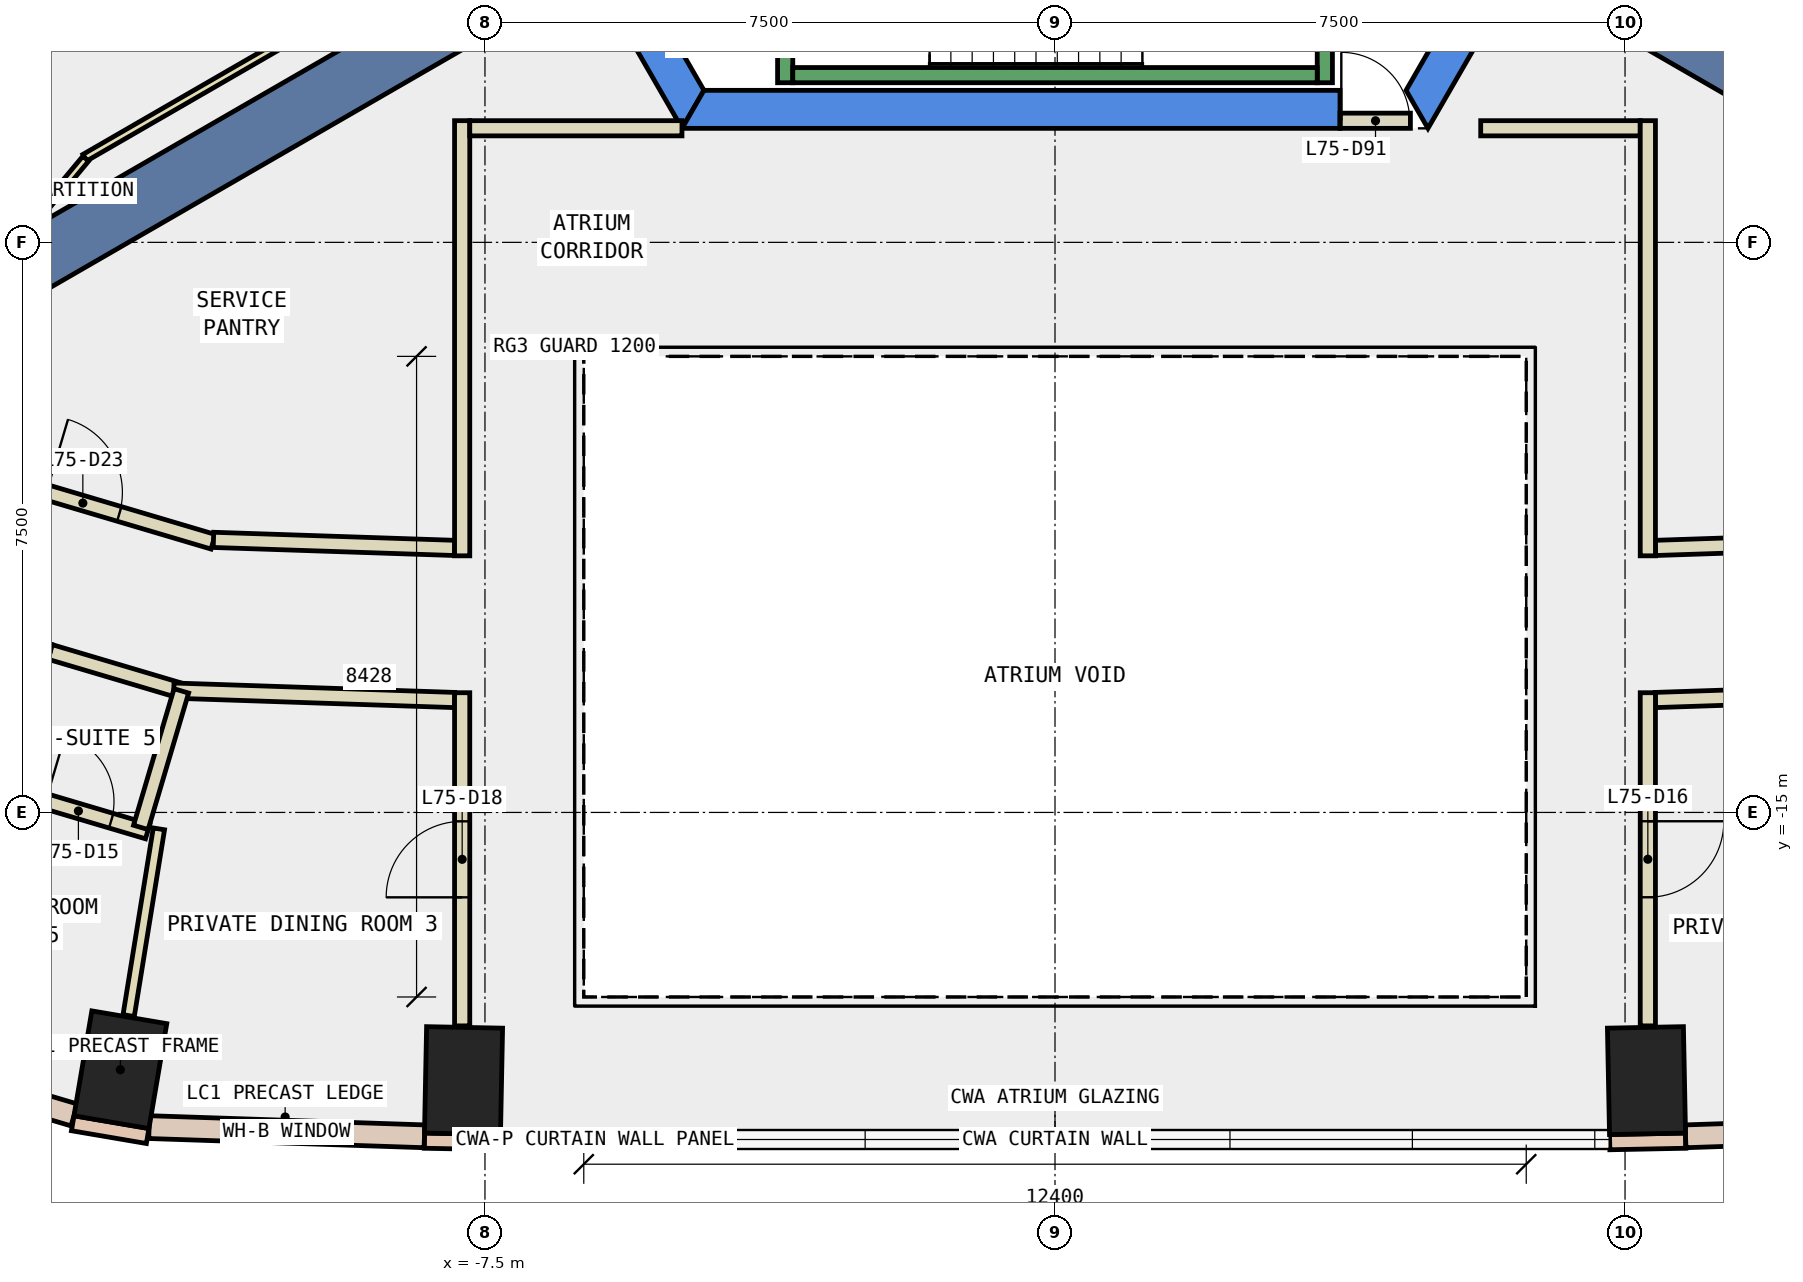
"""IFC4 building model, lengths in metres.
Left out: names, types, materials, properties, quantities, classifications, styles, units other than length and angle.
Written with IfcOpenShell. Run it as: python <this file> out.ifc"""

import sys

from ifc_helpers import new_model, si_unit, direction, frame, frame_2d, origin, origin_2d, place, context, subcontext, project, spatial, polyline, rectangle, outline, extrude, element, fill, save


model = new_model("IFC4")
c1 = context("Model", 3, precision=1e-05, world=origin(), true_north=direction((0.0, 1.0)))
c2 = subcontext(c1, "Body", "Model", "MODEL_VIEW")
j1 = project(units=[si_unit("LENGTHUNIT", "METRE"), si_unit("PLANEANGLEUNIT", "RADIAN")], contexts=[c1])
p1 = place(None, origin())
s1 = spatial("IfcSite", under=j1, at=p1, CompositionType="ELEMENT")
p2 = place(p1, origin())
s2 = spatial("IfcBuilding", under=s1, at=p2, CompositionType="ELEMENT")
p3 = place(p2, frame((0.0, 0.0, 318.8)))
s3 = spatial("IfcBuildingStorey", under=s2, at=p3, CompositionType="ELEMENT", Elevation=318.8)
for number, where, z_axis, x_axis in (
    (1, (-12.297, -18.385, -0.34), (0.0, 0.0, 1.0), (-0.986, 0.168, 0.0)),
    (2, (-7.782, -18.528, -0.34), (0.0, 0.0, 1.0), (-1.0, 0.02, 0.0)),
    (3, (7.782, -18.528, -0.34), (0.0, 0.0, 1.0), (1.0, 0.02, 0.0)),
):
    element("IfcColumn", number, at=place(p3, frame(where, z_axis=z_axis, x_axis=x_axis)), inside=s3, PredefinedType="COLUMN", context=c2, shape_type="SweptSolid", body=[
        extrude(rectangle(XDim=1.0, YDim=1.4, at=origin_2d()), origin(), (0.0, 0.0, 1.0), 3.6),
    ])
p4 = place(p3, frame((0.0, 0.0, -0.34)))
e4 = element("IfcWall", 4, at=p4, inside=s3, PredefinedType="SHEAR", context=c2, shape_type="SweptSolid", body=[
    extrude(outline(polyline([(-9.815, 2.5), (-4.907, -6.0), (-4.619, -5.5), (-9.238, 2.5), (-9.815, 2.5)])), origin(), (0.0, 0.0, 1.0), 3.6),
])
p5 = place(p3, frame((0.0, 0.0, -0.34)))
e5 = element("IfcWall", 5, at=p5, inside=s3, PredefinedType="SHEAR", context=c2, shape_type="SweptSolid", body=[
    extrude(outline(polyline([(3.75, -6.0), (3.75, -5.5), (-4.619, -5.5), (-4.907, -6.0), (3.75, -6.0)])), origin(), (0.0, 0.0, 1.0), 3.6),
])
p6 = place(p3, frame((0.0, 0.0, -0.34)))
e6 = element("IfcWall", 6, at=p6, inside=s3, PredefinedType="SHEAR", context=c2, shape_type="SweptSolid", body=[
    extrude(outline(polyline([(4.907, -6.0), (9.815, 2.5), (9.238, 2.5), (4.619, -5.5), (4.907, -6.0)])), origin(), (0.0, 0.0, 1.0), 3.6),
])
for number, where, z_axis, x_axis in (
    (7, (6.279, -3.625, -0.34), (0.0, 0.0, 1.0), (0.866, -0.5, 0.0)),
    (8, (-6.279, -3.625, -0.34), (0.0, 0.0, 1.0), (-0.866, -0.5, 0.0)),
):
    element("IfcWall", number, at=place(p3, frame(where, z_axis=z_axis, x_axis=x_axis)), inside=s3, PredefinedType="SHEAR", context=c2, shape_type="SweptSolid", body=[
        extrude(rectangle(XDim=9.0, YDim=0.8, at=frame_2d((4.5, 0.0))), origin(), (0.0, 0.0, 1.0), 3.6),
    ])
for number, where, z_axis, x_axis in (
    (9, (-12.924, -19.089, 0.0), (0.0, 0.0, 1.0), (0.986, -0.168, 0.0)),
    (10, (-8.298, -19.318, 0.0), (0.0, 0.0, 1.0), (1.0, -0.02, 0.0)),
    (11, (7.298, -19.338, 0.0), (0.0, 0.0, 1.0), (1.0, 0.02, 0.0)),
):
    element("IfcWall", number, at=place(p3, frame(where, z_axis=z_axis, x_axis=x_axis)), inside=s3, PredefinedType="STANDARD", context=c2, shape_type="SweptSolid", body=[
        extrude(rectangle(XDim=1.0, YDim=0.2, at=frame_2d((0.5, 0.0))), origin(), (0.0, 0.0, 1.0), 3.26),
    ])
p7 = place(p3, frame((-11.919, -19.14, 0.0), z_axis=(0.0, 0.0, 1.0), x_axis=(0.999441913039, -0.033404527552, 0.0)))
e12 = element("IfcWall", 12, at=p7, inside=s3, PredefinedType="STANDARD", context=c2, shape_type="SweptSolid", body=[
    extrude(rectangle(XDim=3.625, YDim=0.3, at=frame_2d((1.812, 0.0))), origin(), (0.0, 0.0, 1.0), 3.26),
])
p8 = place(p7, frame((1.113, 0.0, 0.9)))
e13 = element("IfcOpeningElement", 13, at=p8, cuts=e12, PredefinedType="OPENING", context=c2, shape_type="SweptSolid", body=[
    extrude(rectangle(XDim=1.4, YDim=2.0, at=frame_2d((0.7, 1.0))), frame((0.0, 0.16, 0.0), z_axis=(0.0, -1.0, 0.0), x_axis=(1.0, 0.0, 0.0)), (0.0, 0.0, 1.0), 0.32),
])
p9 = place(p3, frame((8.296, -19.261, 0.0), z_axis=(0.0, 0.0, 1.0), x_axis=(0.999441913039, 0.033404527552, 0.0)))
e14 = element("IfcWall", 14, at=p9, inside=s3, PredefinedType="STANDARD", context=c2, shape_type="SweptSolid", body=[
    extrude(rectangle(XDim=3.625, YDim=0.3, at=frame_2d((1.812, 0.0))), origin(), (0.0, 0.0, 1.0), 3.26),
])
p10 = place(p9, frame((1.113, 0.0, 0.9)))
e15 = element("IfcOpeningElement", 15, at=p10, cuts=e14, PredefinedType="OPENING", context=c2, shape_type="SweptSolid", body=[
    extrude(rectangle(XDim=1.4, YDim=2.0, at=frame_2d((0.7, 1.0))), frame((0.0, 0.16, 0.0), z_axis=(0.0, -1.0, 0.0), x_axis=(1.0, 0.0, 0.0)), (0.0, 0.0, 1.0), 0.32),
])
p11 = place(p3, frame((-17.842, -17.516, 0.0), z_axis=(0.0, 0.0, 1.0), x_axis=(0.958757933751, -0.284223898486, 0.0)))
e16 = element("IfcWall", 16, at=p11, inside=s3, PredefinedType="STANDARD", context=c2, shape_type="SweptSolid", body=[
    extrude(rectangle(XDim=5.15, YDim=0.3, at=frame_2d((2.575, 0.0))), origin(), (0.0, 0.0, 1.0), 3.26),
])
p12 = place(p11, frame((0.588, 0.0, 0.9)))
e17 = element("IfcOpeningElement", 17, at=p12, cuts=e16, PredefinedType="OPENING", context=c2, shape_type="SweptSolid", body=[
    extrude(rectangle(XDim=1.4, YDim=2.0, at=frame_2d((0.7, 1.0))), frame((0.0, 0.16, 0.0), z_axis=(0.0, -1.0, 0.0), x_axis=(1.0, 0.0, 0.0)), (0.0, 0.0, 1.0), 0.32),
])
p13 = place(p11, frame((3.163, 0.0, 0.9)))
e18 = element("IfcOpeningElement", 18, at=p13, cuts=e16, PredefinedType="OPENING", context=c2, shape_type="SweptSolid", body=[
    extrude(rectangle(XDim=1.4, YDim=2.0, at=frame_2d((0.7, 1.0))), frame((0.0, 0.16, 0.0), z_axis=(0.0, -1.0, 0.0), x_axis=(1.0, 0.0, 0.0)), (0.0, 0.0, 1.0), 0.32),
])
p14 = place(p3, frame((7.9, -11.52, 0.0), z_axis=(0.0, 0.0, 1.0), x_axis=(0.999442599499, 0.033383982774, 0.0)))
e19 = element("IfcWall", 19, at=p14, inside=s3, PredefinedType="PARTITIONING", context=c2, shape_type="SweptSolid", body=[
    extrude(rectangle(XDim=3.174, YDim=0.2, at=frame_2d((1.587, 0.0))), origin(), (0.0, 0.0, 1.0), 3.26),
])
p15 = place(p3, frame((-11.489, 1.942, 0.0), z_axis=(0.0, 0.0, 1.0), x_axis=(-0.475643534049, -0.879638123615, 0.0)))
e20 = element("IfcWall", 20, at=p15, inside=s3, PredefinedType="PARTITIONING", context=c2, shape_type="SweptSolid", body=[
    extrude(rectangle(XDim=7.871, YDim=0.2, at=frame_2d((3.936, 0.0))), origin(), (0.0, 0.0, 1.0), 3.26),
])
p16 = place(p15, frame((3.436, 0.0, 0.0)))
e21 = element("IfcOpeningElement", 21, at=p16, cuts=e20, PredefinedType="OPENING", context=c2, shape_type="SweptSolid", body=[
    extrude(rectangle(XDim=1.0, YDim=2.1, at=frame_2d((0.5, 1.05))), frame((0.0, 0.11, 0.0), z_axis=(0.0, -1.0, 0.0), x_axis=(1.0, 0.0, 0.0)), (0.0, 0.0, 1.0), 0.22),
])
p17 = place(p3, frame((-14.506, -10.422, 0.0), z_axis=(0.0, 0.0, 1.0), x_axis=(0.958760241353, -0.284216114252, 0.0)))
e22 = element("IfcWall", 22, at=p17, inside=s3, PredefinedType="PARTITIONING", context=c2, shape_type="SweptSolid", body=[
    extrude(rectangle(XDim=3.578, YDim=0.2, at=frame_2d((1.789, 0.0))), origin(), (0.0, 0.0, 1.0), 3.26),
])
p18 = place(p17, frame((1.289, 0.0, 0.0)))
e23 = element("IfcOpeningElement", 23, at=p18, cuts=e22, PredefinedType="OPENING", context=c2, shape_type="SweptSolid", body=[
    extrude(rectangle(XDim=1.0, YDim=2.1, at=frame_2d((0.5, 1.05))), frame((0.0, 0.11, 0.0), z_axis=(0.0, -1.0, 0.0), x_axis=(1.0, 0.0, 0.0)), (0.0, 0.0, 1.0), 0.22),
])
p19 = place(p3, frame((-11.072, -11.414, 0.0), z_axis=(0.0, 0.0, 1.0), x_axis=(0.999442599499, -0.033383982774, 0.0)))
e24 = element("IfcWall", 24, at=p19, inside=s3, PredefinedType="PARTITIONING", context=c2, shape_type="SweptSolid", body=[
    extrude(rectangle(XDim=3.174, YDim=0.2, at=frame_2d((1.587, 0.0))), origin(), (0.0, 0.0, 1.0), 3.26),
])
p20 = place(p3, frame((11.52, -13.4, 0.0), z_axis=(0.0, 0.0, 1.0), x_axis=(-0.999441010134, -0.033431530957, 0.0)))
e25 = element("IfcWall", 25, at=p20, inside=s3, PredefinedType="PARTITIONING", context=c2, shape_type="SweptSolid", body=[
    extrude(rectangle(XDim=3.622, YDim=0.2, at=frame_2d((1.811, 0.0))), origin(), (0.0, 0.0, 1.0), 3.26),
])
p21 = place(p3, frame((-13.22, -12.889, 0.0), z_axis=(0.0, 0.0, 1.0), x_axis=(-0.958789155152, 0.284118559693, 0.0)))
e26 = element("IfcWall", 26, at=p21, inside=s3, PredefinedType="PARTITIONING", context=c2, shape_type="SweptSolid", body=[
    extrude(rectangle(XDim=2.2, YDim=0.2, at=frame_2d((1.1, 0.0))), origin(), (0.0, 0.0, 1.0), 3.26),
])
p22 = place(p3, frame((-11.495, -13.401, 0.0), z_axis=(0.0, 0.0, 1.0), x_axis=(-0.958662482938, 0.284545679649, 0.0)))
e27 = element("IfcWall", 27, at=p22, inside=s3, PredefinedType="PARTITIONING", context=c2, shape_type="SweptSolid", body=[
    extrude(rectangle(XDim=1.799, YDim=0.2, at=frame_2d((0.9, 0.0))), origin(), (0.0, 0.0, 1.0), 3.26),
])
p23 = place(p3, frame((-7.9, -13.521, 0.0), z_axis=(0.0, 0.0, 1.0), x_axis=(-0.999437184802, 0.033545694739, 0.0)))
e28 = element("IfcWall", 28, at=p23, inside=s3, PredefinedType="PARTITIONING", context=c2, shape_type="SweptSolid", body=[
    extrude(rectangle(XDim=3.697, YDim=0.2, at=frame_2d((1.849, 0.0))), origin(), (0.0, 0.0, 1.0), 3.26),
])
p24 = place(p3, frame((5.601, -5.999, 0.0), z_axis=(0.0, 0.0, 1.0), x_axis=(1.0, 0.0, 0.0)))
e29 = element("IfcWall", 29, at=p24, inside=s3, PredefinedType="PARTITIONING", context=c2, shape_type="SweptSolid", body=[
    extrude(rectangle(XDim=2.099, YDim=0.2, at=frame_2d((1.049, 0.0))), origin(), (0.0, 0.0, 1.0), 3.26),
])
for number, where, z_axis, x_axis in (
    (30, (7.8, -5.899, 0.0), (0.0, 0.0, 1.0), (0.0, -1.0, 0.0)),
    (31, (-7.8, -11.624, 0.0), (0.0, 0.0, 1.0), (0.0, 1.0, 0.0)),
):
    element("IfcWall", number, at=place(p3, frame(where, z_axis=z_axis, x_axis=x_axis)), inside=s3, PredefinedType="PARTITIONING", context=c2, shape_type="SweptSolid", body=[
        extrude(rectangle(XDim=5.725, YDim=0.2, at=frame_2d((2.863, 0.0))), origin(), (0.0, 0.0, 1.0), 3.26),
    ])
p25 = place(p3, frame((-7.7, -5.999, 0.0), z_axis=(0.0, 0.0, 1.0), x_axis=(1.0, 0.0, 0.0)))
e32 = element("IfcWall", 32, at=p25, inside=s3, PredefinedType="PARTITIONING", context=c2, shape_type="SweptSolid", body=[
    extrude(rectangle(XDim=2.792, YDim=0.2, at=frame_2d((1.396, 0.0))), origin(), (0.0, 0.0, 1.0), 3.26),
])
p26 = place(p3, frame((7.8, -13.425, 0.0), z_axis=(0.0, 0.0, 1.0), x_axis=(0.0, -1.0, 0.0)))
e33 = element("IfcWall", 33, at=p26, inside=s3, PredefinedType="PARTITIONING", context=c2, shape_type="SweptSolid", body=[
    extrude(rectangle(XDim=4.383, YDim=0.2, at=frame_2d((2.191, 0.0))), origin(), (0.0, 0.0, 1.0), 3.26),
])
p27 = place(p26, frame((1.691, 0.0, 0.0)))
e34 = element("IfcOpeningElement", 34, at=p27, cuts=e33, PredefinedType="OPENING", context=c2, shape_type="SweptSolid", body=[
    extrude(rectangle(XDim=1.0, YDim=2.1, at=frame_2d((0.5, 1.05))), frame((0.0, 0.11, 0.0), z_axis=(0.0, -1.0, 0.0), x_axis=(1.0, 0.0, 0.0)), (0.0, 0.0, 1.0), 0.22),
])
p28 = place(p3, frame((-7.8, -17.808, 0.0), z_axis=(0.0, 0.0, 1.0), x_axis=(0.0, 1.0, 0.0)))
e35 = element("IfcWall", 35, at=p28, inside=s3, PredefinedType="PARTITIONING", context=c2, shape_type="SweptSolid", body=[
    extrude(rectangle(XDim=4.383, YDim=0.2, at=frame_2d((2.191, 0.0))), origin(), (0.0, 0.0, 1.0), 3.26),
])
p29 = place(p28, frame((1.691, 0.0, 0.0)))
e36 = element("IfcOpeningElement", 36, at=p29, cuts=e35, PredefinedType="OPENING", context=c2, shape_type="SweptSolid", body=[
    extrude(rectangle(XDim=1.0, YDim=2.1, at=frame_2d((0.5, 1.05))), frame((0.0, 0.11, 0.0), z_axis=(0.0, -1.0, 0.0), x_axis=(1.0, 0.0, 0.0)), (0.0, 0.0, 1.0), 0.22),
])
p30 = place(p3, frame((-6.705, -2.887, 0.0), z_axis=(0.0, 0.0, 1.0), x_axis=(-0.866001397039, -0.500041578597, 0.0)))
e37 = element("IfcWall", 37, at=p30, inside=s3, PredefinedType="PARTITIONING", context=c2, shape_type="SweptSolid", body=[
    extrude(rectangle(XDim=6.998, YDim=0.1, at=frame_2d((3.499, 0.0))), origin(), (0.0, 0.0, 1.0), 3.26),
])
p31 = place(p3, frame((-12.753, -6.399, 0.0), z_axis=(0.0, 0.0, 1.0), x_axis=(-0.640077503072, -0.768310347491, 0.0)))
e38 = element("IfcWall", 38, at=p31, inside=s3, PredefinedType="PARTITIONING", context=c2, shape_type="SweptSolid", body=[
    extrude(rectangle(XDim=1.123, YDim=0.1, at=frame_2d((0.562, 0.0))), origin(), (0.0, 0.0, 1.0), 3.26),
])
p32 = place(p3, frame((-13.76, -14.711, 0.0), z_axis=(0.0, 0.0, 1.0), x_axis=(0.958772187895, -0.284175811285, 0.0)))
e39 = element("IfcWall", 39, at=p32, inside=s3, PredefinedType="PARTITIONING", context=c2, shape_type="SweptSolid", body=[
    extrude(rectangle(XDim=1.9, YDim=0.2, at=frame_2d((0.95, 0.0))), origin(), (0.0, 0.0, 1.0), 3.26),
])
p33 = place(p32, frame((0.5, 0.0, 0.0)))
e40 = element("IfcOpeningElement", 40, at=p33, cuts=e39, PredefinedType="OPENING", context=c2, shape_type="SweptSolid", body=[
    extrude(rectangle(XDim=0.9, YDim=2.1, at=frame_2d((0.45, 1.05))), frame((0.0, 0.11, 0.0), z_axis=(0.0, -1.0, 0.0), x_axis=(1.0, 0.0, 0.0)), (0.0, 0.0, 1.0), 0.22),
])
p34 = place(p3, frame((-11.79, -15.216, 0.0), z_axis=(0.0, 0.0, 1.0), x_axis=(-0.159880010227, -0.98713645578, 0.0)))
e41 = element("IfcWall", 41, at=p34, inside=s3, PredefinedType="PARTITIONING", context=c2, shape_type="SweptSolid", body=[
    extrude(rectangle(XDim=2.489, YDim=0.15, at=frame_2d((1.245, 0.0))), origin(), (0.0, 0.0, 1.0), 3.26),
])
p35 = place(p3, frame((-11.495, -13.401, 0.0), z_axis=(0.0, 0.0, 1.0), x_axis=(-0.284465432667, -0.958686297815, 0.0)))
e42 = element("IfcWall", 42, at=p35, inside=s3, PredefinedType="PARTITIONING", context=c2, shape_type="SweptSolid", body=[
    extrude(rectangle(XDim=1.874, YDim=0.2, at=frame_2d((0.937, 0.0))), origin(), (0.0, 0.0, 1.0), 3.26),
])
p36 = place(p3, frame((3.75, -5.9, 0.0), z_axis=(0.0, 0.0, 1.0), x_axis=(1.0, 0.0, 0.0)))
e43 = element("IfcWall", 43, at=p36, inside=s3, PredefinedType="PARTITIONING", context=c2, shape_type="SweptSolid", body=[
    extrude(rectangle(XDim=0.926, YDim=0.2, at=frame_2d((0.463, 0.0))), origin(), (0.0, 0.0, 1.0), 2.4),
])
p37 = place(p36, frame((0.017, 0.0, 0.0)))
e44 = element("IfcOpeningElement", 44, at=p37, cuts=e43, PredefinedType="OPENING", context=c2, shape_type="SweptSolid", body=[
    extrude(rectangle(XDim=0.9, YDim=2.1, at=frame_2d((0.45, 1.05))), frame((0.0, 0.11, 0.0), z_axis=(0.0, -1.0, 0.0), x_axis=(1.0, 0.0, 0.0)), (0.0, 0.0, 1.0), 0.22),
])
p38 = place(p3, frame((-3.55, -1.0, 0.0), z_axis=(0.0, 0.0, 1.0), x_axis=(0.0, -1.0, 0.0)))
e45 = element("IfcWall", 45, at=p38, inside=s3, PredefinedType="STANDARD", context=c2, shape_type="SweptSolid", body=[
    extrude(rectangle(XDim=4.4, YDim=0.2, at=frame_2d((2.2, 0.0))), origin(), (0.0, 0.0, 1.0), 3.26),
])
p39 = place(p38, frame((2.4, 0.0, 0.0)))
e46 = element("IfcOpeningElement", 46, at=p39, cuts=e45, PredefinedType="OPENING", context=c2, shape_type="SweptSolid", body=[
    extrude(rectangle(XDim=1.1, YDim=2.2, at=frame_2d((0.55, 1.1))), frame((0.0, 0.11, 0.0), z_axis=(0.0, -1.0, 0.0), x_axis=(1.0, 0.0, 0.0)), (0.0, 0.0, 1.0), 0.22),
])
p40 = place(p3, frame((3.55, -2.667, 0.0), z_axis=(0.0, 0.0, 1.0), x_axis=(0.0, -1.0, 0.0)))
e47 = element("IfcWall", 47, at=p40, inside=s3, PredefinedType="STANDARD", context=c2, shape_type="SweptSolid", body=[
    extrude(rectangle(XDim=2.733, YDim=0.2, at=frame_2d((1.366, 0.0))), origin(), (0.0, 0.0, 1.0), 3.26),
])
p41 = place(p3, frame((-3.45, -5.3, 0.0), z_axis=(0.0, 0.0, 1.0), x_axis=(1.0, 0.0, 0.0)))
e48 = element("IfcWall", 48, at=p41, inside=s3, PredefinedType="STANDARD", context=c2, shape_type="SweptSolid", body=[
    extrude(rectangle(XDim=6.9, YDim=0.2, at=frame_2d((3.45, 0.0))), origin(), (0.0, 0.0, 1.0), 3.26),
])
p42 = place(p8, origin())
e49 = element("IfcWindow", 49, at=p42, inside=s3, PartitioningType="SINGLE_PANEL", PredefinedType="WINDOW", context=c2, shape_type="SweptSolid", body=[
    extrude(rectangle(XDim=1.4, YDim=2.0, at=frame_2d((0.7, 1.0))), frame((0.0, 0.03, 0.0), z_axis=(0.0, -1.0, 0.0), x_axis=(1.0, 0.0, 0.0)), (0.0, 0.0, 1.0), 0.06),
])
fill(e13, e49)
p43 = place(p33, origin())
e50 = element("IfcDoor", 50, at=p43, inside=s3, OperationType="SINGLE_SWING_LEFT", PredefinedType="DOOR", context=c2, shape_type="SweptSolid", body=[
    extrude(rectangle(XDim=0.9, YDim=2.1, at=frame_2d((0.45, 1.05))), frame((0.0, 0.025, 0.0), z_axis=(0.0, -1.0, 0.0), x_axis=(1.0, 0.0, 0.0)), (0.0, 0.0, 1.0), 0.05),
])
fill(e40, e50)
p44 = place(p27, origin())
e51 = element("IfcDoor", 51, at=p44, inside=s3, OperationType="SINGLE_SWING_LEFT", PredefinedType="DOOR", context=c2, shape_type="SweptSolid", body=[
    extrude(rectangle(XDim=1.0, YDim=2.1, at=frame_2d((0.5, 1.05))), frame((0.0, 0.025, 0.0), z_axis=(0.0, -1.0, 0.0), x_axis=(1.0, 0.0, 0.0)), (0.0, 0.0, 1.0), 0.05),
])
fill(e34, e51)
p45 = place(p29, origin())
e52 = element("IfcDoor", 52, at=p45, inside=s3, OperationType="SINGLE_SWING_LEFT", PredefinedType="DOOR", context=c2, shape_type="SweptSolid", body=[
    extrude(rectangle(XDim=1.0, YDim=2.1, at=frame_2d((0.5, 1.05))), frame((0.0, 0.025, 0.0), z_axis=(0.0, -1.0, 0.0), x_axis=(1.0, 0.0, 0.0)), (0.0, 0.0, 1.0), 0.05),
])
fill(e36, e52)
p46 = place(p18, origin())
e53 = element("IfcDoor", 53, at=p46, inside=s3, OperationType="SINGLE_SWING_RIGHT", PredefinedType="DOOR", context=c2, shape_type="SweptSolid", body=[
    extrude(rectangle(XDim=1.0, YDim=2.1, at=frame_2d((0.5, 1.05))), frame((0.0, 0.025, 0.0), z_axis=(0.0, -1.0, 0.0), x_axis=(1.0, 0.0, 0.0)), (0.0, 0.0, 1.0), 0.05),
])
fill(e23, e53)
p47 = place(p37, origin())
e54 = element("IfcDoor", 54, at=p47, inside=s3, OperationType="SINGLE_SWING_LEFT", PredefinedType="DOOR", context=c2, shape_type="SweptSolid", body=[
    extrude(rectangle(XDim=0.9, YDim=2.1, at=frame_2d((0.45, 1.05))), frame((0.0, 0.025, 0.0), z_axis=(0.0, -1.0, 0.0), x_axis=(1.0, 0.0, 0.0)), (0.0, 0.0, 1.0), 0.05),
])
fill(e44, e54)
save(model, sys.argv[1])
